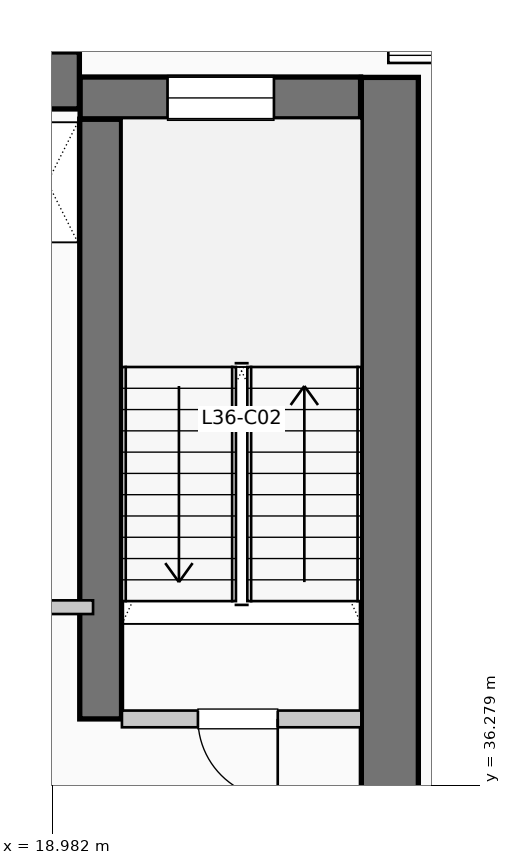
"""IFC4 building model, lengths in metres.
Left out: names, types, materials, properties, quantities, classifications, styles, units other than length and angle.
Written with IfcOpenShell. Run it as: python <this file> out.ifc"""

import sys

from ifc_helpers import new_model, si_unit, direction, frame, frame_2d, origin, place, context, subcontext, project, spatial, rectangle, extrude, element, fill, save


model = new_model("IFC4")
c1 = context("Model", 3, precision=1e-05, world=origin(), true_north=direction((0.0, 1.0)))
c2 = subcontext(c1, "Body", "Model", "MODEL_VIEW")
j1 = project(units=[si_unit("LENGTHUNIT", "METRE"), si_unit("PLANEANGLEUNIT", "RADIAN")], contexts=[c1])
p1 = place(None, origin())
s1 = spatial("IfcSite", under=j1, at=p1, CompositionType="ELEMENT")
p2 = place(p1, origin())
s2 = spatial("IfcBuilding", under=s1, at=p2, CompositionType="ELEMENT")
p3 = place(p2, frame((0.0, 0.0, 150.81)))
s3 = spatial("IfcBuildingStorey", under=s2, at=p3, CompositionType="ELEMENT", Elevation=150.81)
p4 = place(p3, frame((5.36, 45.55, 0.0), z_axis=(0.0, 0.0, 1.0), x_axis=(1.0, 0.0, 0.0)))
e1 = element("IfcWall", 1, at=p4, inside=s3, PredefinedType="SHEAR", context=c2, shape_type="SweptSolid", body=[
    extrude(rectangle(XDim=13.98, YDim=0.75, at=frame_2d((6.99, 0.0))), origin(), (0.0, 0.0, 1.0), 3.96),
])
p5 = place(p3, frame((23.425, 34.95, 0.0), z_axis=(0.0, 0.0, 1.0), x_axis=(0.0, 1.0, 0.0)))
e2 = element("IfcWall", 2, at=p5, inside=s3, PredefinedType="SHEAR", context=c2, shape_type="SweptSolid", body=[
    extrude(rectangle(XDim=10.64, YDim=0.75, at=frame_2d((5.32, 0.0))), origin(), (0.0, 0.0, 1.0), 3.96),
])
p6 = place(p3, frame((19.62, 37.15, 0.0), z_axis=(0.0, 0.0, 1.0), x_axis=(0.0, 1.0, 0.0)))
e3 = element("IfcWall", 3, at=p6, inside=s3, PredefinedType="SHEAR", context=c2, shape_type="SweptSolid", body=[
    extrude(rectangle(XDim=7.89, YDim=0.55, at=frame_2d((3.945, 0.0))), origin(), (0.0, 0.0, 1.0), 3.96),
])
p7 = place(p3, frame((19.35, 45.32, 0.0), z_axis=(0.0, 0.0, 1.0), x_axis=(1.0, 0.0, 0.0)))
e4 = element("IfcWall", 4, at=p7, inside=s3, PredefinedType="SHEAR", context=c2, shape_type="SweptSolid", body=[
    extrude(rectangle(XDim=3.69, YDim=0.55, at=frame_2d((1.845, 0.0))), origin(), (0.0, 0.0, 1.0), 3.96),
])
p8 = place(p7, frame((1.15, 0.0, 1.05)))
e5 = element("IfcOpeningElement", 5, at=p8, cuts=e4, PredefinedType="OPENING", context=c2, shape_type="SweptSolid", body=[
    extrude(rectangle(XDim=1.4, YDim=1.8, at=frame_2d((0.7, 0.9))), frame((0.0, 0.285, 0.0), z_axis=(0.0, -1.0, 0.0), x_axis=(1.0, 0.0, 0.0)), (0.0, 0.0, 1.0), 0.57),
])
p9 = place(p3, frame((19.9, 37.15, 0.0), z_axis=(0.0, 0.0, 1.0), x_axis=(1.0, 0.0, 0.0)))
e6 = element("IfcWall", 6, at=p9, inside=s3, PredefinedType="PARTITIONING", context=c2, shape_type="SweptSolid", body=[
    extrude(rectangle(XDim=3.15, YDim=0.22, at=frame_2d((1.575, 0.0))), origin(), (0.0, 0.0, 1.0), 3.71),
])
p10 = place(p9, frame((2.05, 0.0, 0.0), z_axis=(0.0, 0.0, 1.0), x_axis=(-1.0, 0.0, 0.0)))
e7 = element("IfcOpeningElement", 7, at=p10, cuts=e6, PredefinedType="OPENING", context=c2, shape_type="SweptSolid", body=[
    extrude(rectangle(XDim=1.05, YDim=2.15, at=frame_2d((0.525, 1.075))), frame((0.0, 0.12, 0.0), z_axis=(0.0, -1.0, 0.0), x_axis=(1.0, 0.0, 0.0)), (0.0, 0.0, 1.0), 0.24),
])
p11 = place(p3, frame((17.68, 38.62, 0.0), z_axis=(0.0, 0.0, 1.0), x_axis=(1.0, 0.0, 0.0)))
e8 = element("IfcWall", 8, at=p11, inside=s3, PredefinedType="PARTITIONING", context=c2, shape_type="SweptSolid", body=[
    extrude(rectangle(XDim=1.84, YDim=0.18, at=frame_2d((0.92, 0.0))), origin(), (0.0, 0.0, 1.0), 3.71),
])
p12 = place(p11, frame((0.24, 0.0, 0.0)))
e9 = element("IfcOpeningElement", 9, at=p12, cuts=e8, PredefinedType="OPENING", context=c2, shape_type="SweptSolid", body=[
    extrude(rectangle(XDim=0.92, YDim=2.1, at=frame_2d((0.46, 1.05))), frame((0.0, 0.1, 0.0), z_axis=(0.0, -1.0, 0.0), x_axis=(1.0, 0.0, 0.0)), (0.0, 0.0, 1.0), 0.2),
])
p13 = place(p8, origin())
e10 = element("IfcWindow", 10, at=p13, inside=s3, PartitioningType="SINGLE_PANEL", PredefinedType="WINDOW", context=c2, shape_type="SweptSolid", body=[
    extrude(rectangle(XDim=1.4, YDim=1.8, at=frame_2d((0.7, 0.9))), frame((0.0, 0.03, 0.0), z_axis=(0.0, -1.0, 0.0), x_axis=(1.0, 0.0, 0.0)), (0.0, 0.0, 1.0), 0.06),
])
fill(e5, e10)
p14 = place(p10, origin())
e11 = element("IfcDoor", 11, at=p14, inside=s3, OperationType="SINGLE_SWING_RIGHT", PredefinedType="DOOR", context=c2, shape_type="SweptSolid", body=[
    extrude(rectangle(XDim=1.05, YDim=2.15, at=frame_2d((0.525, 1.075))), frame((0.0, 0.025, 0.0), z_axis=(0.0, -1.0, 0.0), x_axis=(1.0, 0.0, 0.0)), (0.0, 0.0, 1.0), 0.05),
])
fill(e7, e11)
save(model, sys.argv[1])
